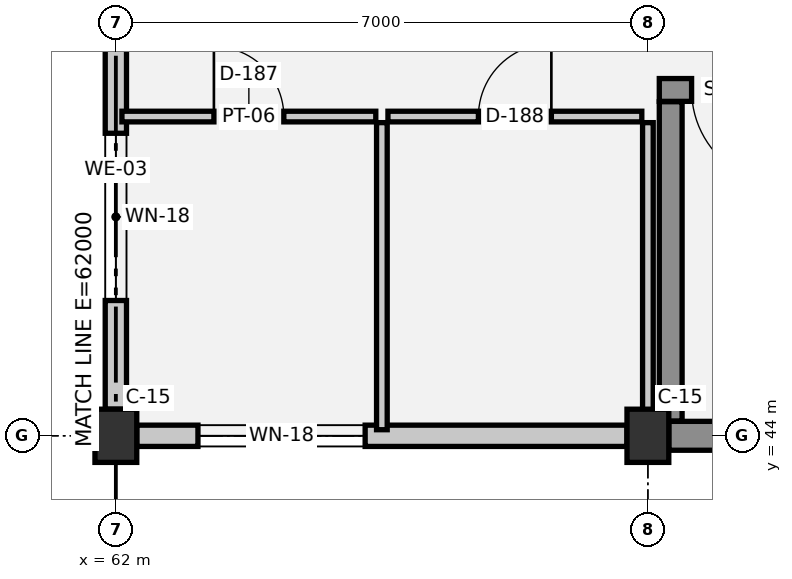
"""IFC4 building model, lengths in metres.
Left out: names, types, materials, properties, quantities, classifications, styles, units other than length and angle.
Written with IfcOpenShell. Run it as: python <this file> out.ifc"""

import sys

from ifc_helpers import new_model, si_unit, direction, frame, frame_2d, origin, origin_2d, place, context, subcontext, project, spatial, rectangle, extrude, element, fill, save


model = new_model("IFC4")
c1 = context("Model", 3, precision=1e-05, world=origin(), true_north=direction((0.0, 1.0)))
c2 = subcontext(c1, "Body", "Model", "MODEL_VIEW")
j1 = project(units=[si_unit("LENGTHUNIT", "METRE"), si_unit("PLANEANGLEUNIT", "RADIAN")], contexts=[c1])
p1 = place(None, origin())
s1 = spatial("IfcSite", under=j1, at=p1, CompositionType="ELEMENT")
p2 = place(p1, origin())
s2 = spatial("IfcBuilding", under=s1, at=p2, CompositionType="ELEMENT")
p3 = place(p2, frame((0.0, 0.0, 29.55)))
s3 = spatial("IfcBuildingStorey", under=s2, at=p3, CompositionType="ELEMENT", Elevation=29.55)
for number, where, z_axis, x_axis in (
    (1, (62.0, 44.0, 0.0), (0.0, 0.0, 1.0), (1.0, 0.0, 0.0)),
    (2, (69.0, 44.0, 0.0), (0.0, 0.0, 1.0), (1.0, 0.0, 0.0)),
):
    element("IfcColumn", number, at=place(p3, frame(where, z_axis=z_axis, x_axis=x_axis)), inside=s3, PredefinedType="COLUMN", context=c2, shape_type="SweptSolid", body=[
        extrude(rectangle(XDim=0.55, YDim=0.7, at=origin_2d()), origin(), (0.0, 0.0, 1.0), 3.75),
    ])
p4 = place(p3, frame((62.0, 44.35, 0.0), z_axis=(0.0, 0.0, 1.0), x_axis=(0.0, 1.0, 0.0)))
e3 = element("IfcWall", 3, at=p4, inside=s3, PredefinedType="SOLIDWALL", context=c2, shape_type="SweptSolid", body=[
    extrude(rectangle(XDim=6.3, YDim=0.28, at=frame_2d((3.15, 0.0))), origin(), (0.0, 0.0, 1.0), 2.56),
])
p5 = place(p4, frame((1.43, 0.0, 0.9)))
e4 = element("IfcOpeningElement", 4, at=p5, cuts=e3, PredefinedType="OPENING", context=c2, shape_type="SweptSolid", body=[
    extrude(rectangle(XDim=2.2, YDim=1.0, at=frame_2d((1.1, 0.5))), frame((0.0, 0.15, 0.0), z_axis=(0.0, -1.0, 0.0), x_axis=(1.0, 0.0, 0.0)), (0.0, 0.0, 1.0), 0.3),
])
p6 = place(p3, frame((76.725, 44.0, 0.0), z_axis=(0.0, 0.0, 1.0), x_axis=(-1.0, 0.0, 0.0)))
e5 = element("IfcWall", 5, at=p6, inside=s3, PredefinedType="STANDARD", context=c2, shape_type="SweptSolid", body=[
    extrude(rectangle(XDim=7.45, YDim=0.38, at=frame_2d((3.725, 0.0))), origin(), (0.0, 0.0, 1.0), 2.56),
])
p7 = place(p3, frame((68.725, 44.0, 0.0), z_axis=(0.0, 0.0, 1.0), x_axis=(-1.0, 0.0, 0.0)))
e6 = element("IfcWall", 6, at=p7, inside=s3, PredefinedType="SOLIDWALL", context=c2, shape_type="SweptSolid", body=[
    extrude(rectangle(XDim=6.45, YDim=0.28, at=frame_2d((3.225, 0.0))), origin(), (0.0, 0.0, 1.0), 2.56),
])
p8 = place(p7, frame((3.445, 0.0, 0.9)))
e7 = element("IfcOpeningElement", 7, at=p8, cuts=e6, PredefinedType="OPENING", context=c2, shape_type="SweptSolid", body=[
    extrude(rectangle(XDim=2.2, YDim=1.0, at=frame_2d((1.1, 0.5))), frame((0.0, 0.15, 0.0), z_axis=(0.0, -1.0, 0.0), x_axis=(1.0, 0.0, 0.0)), (0.0, 0.0, 1.0), 0.3),
])
p9 = place(p3, frame((76.85, 48.55, 0.0), z_axis=(0.0, 0.0, 1.0), x_axis=(-1.0, 0.0, 0.0)))
e8 = element("IfcWall", 8, at=p9, inside=s3, PredefinedType="SHEAR", context=c2, shape_type="SweptSolid", body=[
    extrude(rectangle(XDim=7.7, YDim=0.3, at=frame_2d((3.85, 0.0))), origin(), (0.0, 0.0, 1.0), 3.47),
])
p10 = place(p9, frame((6.025, 0.0, 0.0)))
e9 = element("IfcOpeningElement", 9, at=p10, cuts=e8, PredefinedType="OPENING", context=c2, shape_type="SweptSolid", body=[
    extrude(rectangle(XDim=1.25, YDim=2.15, at=frame_2d((0.625, 1.075))), frame((0.0, 0.16, 0.0), z_axis=(0.0, -1.0, 0.0), x_axis=(1.0, 0.0, 0.0)), (0.0, 0.0, 1.0), 0.32),
])
p11 = place(p3, frame((69.3, 48.395, 0.0), z_axis=(0.0, 0.0, 1.0), x_axis=(0.0, -1.0, 0.0)))
e10 = element("IfcWall", 10, at=p11, inside=s3, PredefinedType="SHEAR", context=c2, shape_type="SweptSolid", body=[
    extrude(rectangle(XDim=4.2, YDim=0.3, at=frame_2d((2.1, 0.0))), origin(), (0.0, 0.0, 1.0), 3.47),
])
p12 = place(p3, frame((62.08, 48.2, 0.0), z_axis=(0.0, 0.0, 1.0), x_axis=(1.0, 0.0, 0.0)))
e11 = element("IfcWall", 11, at=p12, inside=s3, PredefinedType="PLUMBINGWALL", context=c2, shape_type="SweptSolid", body=[
    extrude(rectangle(XDim=3.34, YDim=0.14, at=frame_2d((1.67, 0.0))), origin(), (0.0, 0.0, 1.0), 3.39),
])
p13 = place(p12, frame((1.21, 0.0, 0.0)))
e12 = element("IfcOpeningElement", 12, at=p13, cuts=e11, PredefinedType="OPENING", context=c2, shape_type="SweptSolid", body=[
    extrude(rectangle(XDim=0.92, YDim=2.1, at=frame_2d((0.46, 1.05))), frame((0.0, 0.08, 0.0), z_axis=(0.0, -1.0, 0.0), x_axis=(1.0, 0.0, 0.0)), (0.0, 0.0, 1.0), 0.16),
])
p14 = place(p3, frame((65.58, 48.2, 0.0), z_axis=(0.0, 0.0, 1.0), x_axis=(1.0, 0.0, 0.0)))
e13 = element("IfcWall", 13, at=p14, inside=s3, PredefinedType="PLUMBINGWALL", context=c2, shape_type="SweptSolid", body=[
    extrude(rectangle(XDim=3.34, YDim=0.14, at=frame_2d((1.67, 0.0))), origin(), (0.0, 0.0, 1.0), 3.39),
])
p15 = place(p14, frame((1.19, 0.0, 0.0)))
e14 = element("IfcOpeningElement", 14, at=p15, cuts=e13, PredefinedType="OPENING", context=c2, shape_type="SweptSolid", body=[
    extrude(rectangle(XDim=0.96, YDim=2.1, at=frame_2d((0.48, 1.05))), frame((0.0, 0.08, 0.0), z_axis=(0.0, -1.0, 0.0), x_axis=(1.0, 0.0, 0.0)), (0.0, 0.0, 1.0), 0.16),
])
p16 = place(p3, frame((65.5, 44.08, 0.0), z_axis=(0.0, 0.0, 1.0), x_axis=(0.0, 1.0, 0.0)))
e15 = element("IfcWall", 15, at=p16, inside=s3, PredefinedType="PLUMBINGWALL", context=c2, shape_type="SweptSolid", body=[
    extrude(rectangle(XDim=4.04, YDim=0.14, at=frame_2d((2.02, 0.0))), origin(), (0.0, 0.0, 1.0), 3.39),
])
p17 = place(p3, frame((69.0, 44.08, 0.0), z_axis=(0.0, 0.0, 1.0), x_axis=(0.0, 1.0, 0.0)))
e16 = element("IfcWall", 16, at=p17, inside=s3, PredefinedType="PLUMBINGWALL", context=c2, shape_type="SweptSolid", body=[
    extrude(rectangle(XDim=4.04, YDim=0.14, at=frame_2d((2.02, 0.0))), origin(), (0.0, 0.0, 1.0), 2.13),
])
p18 = place(p5, origin())
e17 = element("IfcWindow", 17, at=p18, inside=s3, PartitioningType="SINGLE_PANEL", PredefinedType="WINDOW", context=c2, shape_type="SweptSolid", body=[
    extrude(rectangle(XDim=2.2, YDim=1.0, at=frame_2d((1.1, 0.5))), frame((0.0, 0.03, 0.0), z_axis=(0.0, -1.0, 0.0), x_axis=(1.0, 0.0, 0.0)), (0.0, 0.0, 1.0), 0.06),
])
fill(e4, e17)
p19 = place(p8, origin())
e18 = element("IfcWindow", 18, at=p19, inside=s3, PartitioningType="SINGLE_PANEL", PredefinedType="WINDOW", context=c2, shape_type="SweptSolid", body=[
    extrude(rectangle(XDim=2.2, YDim=1.0, at=frame_2d((1.1, 0.5))), frame((0.0, 0.03, 0.0), z_axis=(0.0, -1.0, 0.0), x_axis=(1.0, 0.0, 0.0)), (0.0, 0.0, 1.0), 0.06),
])
fill(e7, e18)
p20 = place(p10, origin())
e19 = element("IfcDoor", 19, at=p20, inside=s3, OperationType="SINGLE_SWING_LEFT", PredefinedType="DOOR", context=c2, shape_type="SweptSolid", body=[
    extrude(rectangle(XDim=1.25, YDim=2.15, at=frame_2d((0.625, 1.075))), frame((0.0, 0.025, 0.0), z_axis=(0.0, -1.0, 0.0), x_axis=(1.0, 0.0, 0.0)), (0.0, 0.0, 1.0), 0.05),
])
fill(e9, e19)
p21 = place(p13, origin())
e20 = element("IfcDoor", 20, at=p21, inside=s3, OperationType="SINGLE_SWING_LEFT", PredefinedType="DOOR", context=c2, shape_type="SweptSolid", body=[
    extrude(rectangle(XDim=0.92, YDim=2.1, at=frame_2d((0.46, 1.05))), frame((0.0, 0.025, 0.0), z_axis=(0.0, -1.0, 0.0), x_axis=(1.0, 0.0, 0.0)), (0.0, 0.0, 1.0), 0.05),
])
fill(e12, e20)
p22 = place(p15, origin())
e21 = element("IfcDoor", 21, at=p22, inside=s3, OperationType="SINGLE_SWING_RIGHT", PredefinedType="DOOR", context=c2, shape_type="SweptSolid", body=[
    extrude(rectangle(XDim=0.96, YDim=2.1, at=frame_2d((0.48, 1.05))), frame((0.0, 0.025, 0.0), z_axis=(0.0, -1.0, 0.0), x_axis=(1.0, 0.0, 0.0)), (0.0, 0.0, 1.0), 0.05),
])
fill(e14, e21)
save(model, sys.argv[1])
